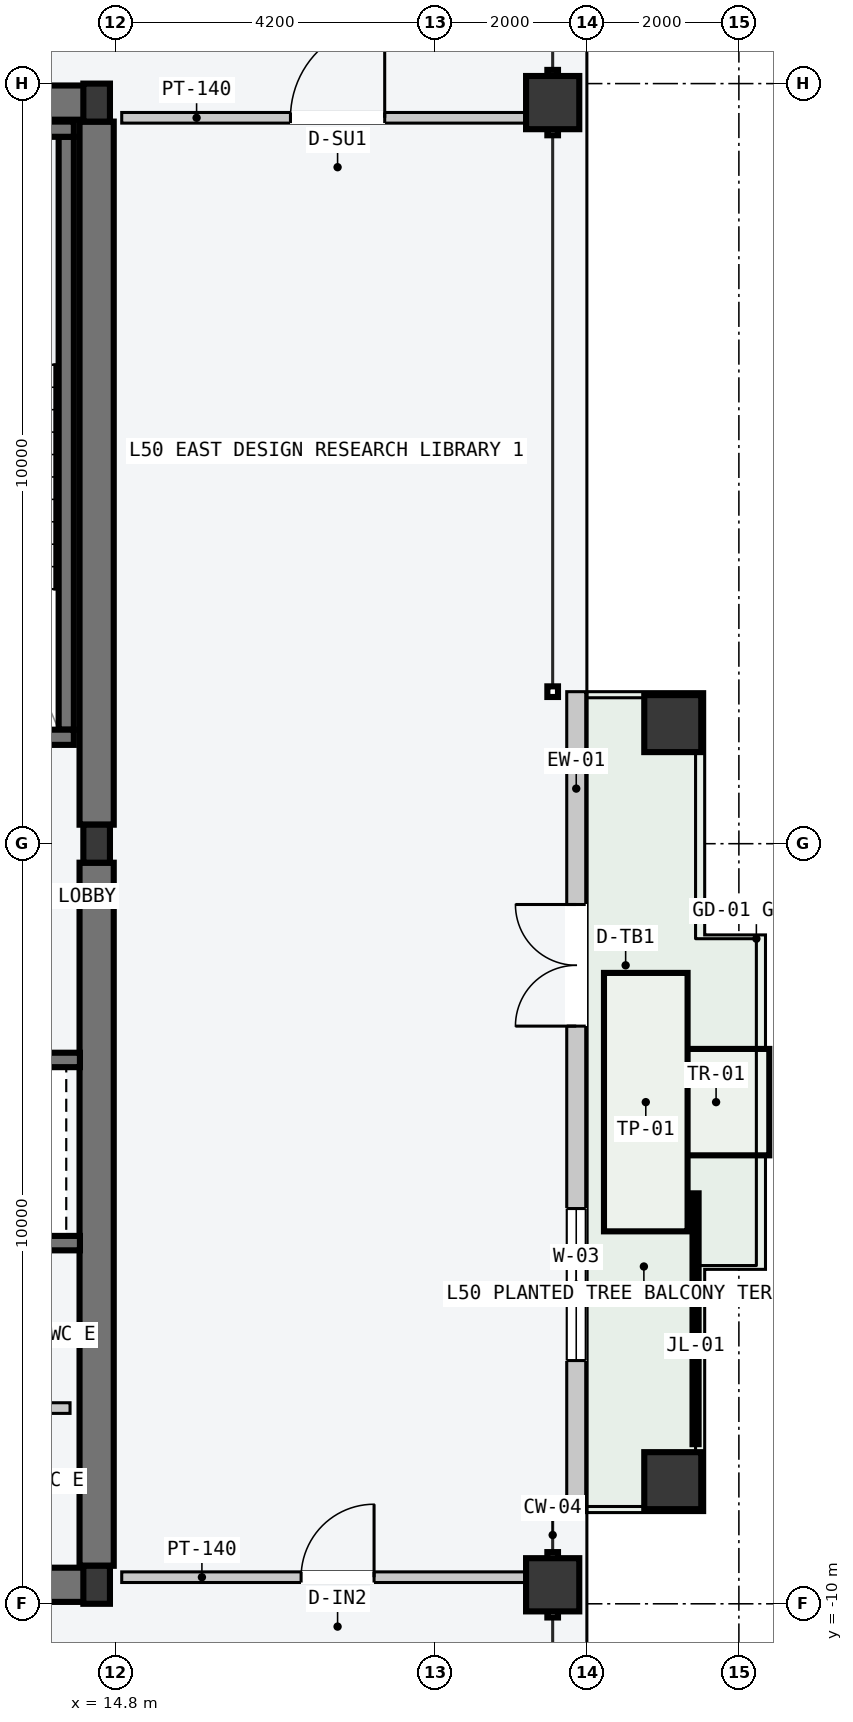
"""IFC4 building model, lengths in metres.
Left out: names, types, materials, properties, quantities, classifications, styles, units other than length and angle.
Written with IfcOpenShell. Run it as: python <this file> out.ifc"""

import sys

from ifc_helpers import new_model, si_unit, direction, frame, frame_2d, origin, origin_2d, place, context, subcontext, project, spatial, rectangle, hollow_rectangle, i_section, extrude, element, fill, save


model = new_model("IFC4")
c1 = context("Model", 3, precision=1e-05, world=origin(), true_north=direction((0.0, 1.0)))
c2 = subcontext(c1, "Body", "Model", "MODEL_VIEW")
j1 = project(units=[si_unit("LENGTHUNIT", "METRE"), si_unit("PLANEANGLEUNIT", "RADIAN")], contexts=[c1])
p1 = place(None, origin())
s1 = spatial("IfcSite", under=j1, at=p1, CompositionType="ELEMENT")
p2 = place(p1, origin())
s2 = spatial("IfcBuilding", under=s1, at=p2, CompositionType="ELEMENT")
p3 = place(p2, frame((0.0, 0.0, 191.1)))
s3 = spatial("IfcBuildingStorey", under=s2, at=p3, CompositionType="ELEMENT", Elevation=191.1)
for number, where, z_axis, x_axis in (
    (1, (8.07, -9.75, -0.2), (0.0, 0.0, 1.0), (1.0, 0.0, 0.0)),
    (2, (8.07, 9.75, -0.2), (0.0, 0.0, 1.0), (1.0, 0.0, 0.0)),
):
    element("IfcWall", number, at=place(p3, frame(where, z_axis=z_axis, x_axis=x_axis)), inside=s3, PredefinedType="SHEAR", context=c2, shape_type="SweptSolid", body=[
        extrude(rectangle(XDim=6.46, YDim=0.45, at=frame_2d((3.23, 0.0))), origin(), (0.0, 0.0, 1.0), 3.6),
    ])
for number, where, z_axis, x_axis in (
    (3, (14.55, -9.5, -0.2), (0.0, 0.0, 1.0), (0.0, 1.0, 0.0)),
    (4, (14.55, 0.25, -0.2), (0.0, 0.0, 1.0), (0.0, 1.0, 0.0)),
):
    element("IfcWall", number, at=place(p3, frame(where, z_axis=z_axis, x_axis=x_axis)), inside=s3, PredefinedType="SHEAR", context=c2, shape_type="SweptSolid", body=[
        extrude(rectangle(XDim=9.25, YDim=0.45, at=frame_2d((4.625, 0.0))), origin(), (0.0, 0.0, 1.0), 3.6),
    ])
p4 = place(p3, frame((14.15, 1.5, -0.2), z_axis=(0.0, 0.0, 1.0), x_axis=(0.0, 1.0, 0.0)))
e5 = element("IfcWall", 5, at=p4, inside=s3, PredefinedType="SOLIDWALL", context=c2, shape_type="SweptSolid", body=[
    extrude(rectangle(XDim=7.8, YDim=0.2, at=frame_2d((3.9, 0.0))), origin(), (0.0, 0.0, 1.0), 3.6),
])
p5 = place(p3, frame((10.53, 1.4, -0.2), z_axis=(0.0, 0.0, 1.0), x_axis=(1.0, 0.0, 0.0)))
e6 = element("IfcWall", 6, at=p5, inside=s3, PredefinedType="SOLIDWALL", context=c2, shape_type="SweptSolid", body=[
    extrude(rectangle(XDim=3.72, YDim=0.2, at=frame_2d((1.86, 0.0))), origin(), (0.0, 0.0, 1.0), 3.6),
])
p6 = place(p5, frame((1.5, 0.0, 0.2)))
e7 = element("IfcOpeningElement", 7, at=p6, cuts=e6, PredefinedType="OPENING", context=c2, shape_type="SweptSolid", body=[
    extrude(rectangle(XDim=1.12, YDim=2.18, at=frame_2d((0.56, 1.09))), frame((0.0, 0.11, 0.0), z_axis=(0.0, -1.0, 0.0), x_axis=(1.0, 0.0, 0.0)), (0.0, 0.0, 1.0), 0.22),
])
p7 = place(p3, frame((10.53, 9.4, -0.2), z_axis=(0.0, 0.0, 1.0), x_axis=(1.0, 0.0, 0.0)))
e8 = element("IfcWall", 8, at=p7, inside=s3, PredefinedType="SOLIDWALL", context=c2, shape_type="SweptSolid", body=[
    extrude(rectangle(XDim=3.72, YDim=0.2, at=frame_2d((1.86, 0.0))), origin(), (0.0, 0.0, 1.0), 3.6),
])
for number, where, z_axis, x_axis in (
    (9, (14.55, -9.75, 0.0), (0.0, 0.0, 1.0), (1.0, 0.0, 0.0)),
    (10, (14.55, 0.0, 0.0), (0.0, 0.0, 1.0), (1.0, 0.0, 0.0)),
    (11, (14.55, 9.75, 0.0), (0.0, 0.0, 1.0), (1.0, 0.0, 0.0)),
):
    element("IfcColumn", number, at=place(p3, frame(where, z_axis=z_axis, x_axis=x_axis)), inside=s3, PredefinedType="COLUMN", context=c2, shape_type="SweptSolid", body=[
        extrude(i_section(OverallWidth=0.35, OverallDepth=0.5, WebThickness=0.02, FlangeThickness=0.032, at=origin_2d()), origin(), (0.0, 0.0, 1.0), 3.6),
    ])
for number, where, z_axis, x_axis in (
    (12, (20.55, -9.75, 0.0), (0.0, 0.0, 1.0), (0.0, 1.0, 0.0)),
    (13, (20.55, 9.75, 0.0), (0.0, 0.0, 1.0), (0.0, 1.0, 0.0)),
):
    element("IfcColumn", number, at=place(p3, frame(where, z_axis=z_axis, x_axis=x_axis)), inside=s3, PredefinedType="COLUMN", context=c2, shape_type="SweptSolid", body=[
        extrude(hollow_rectangle(XDim=0.7, YDim=0.7, WallThickness=0.03, at=origin_2d()), origin(), (0.0, 0.0, 1.0), 3.6),
    ])
for number, where, z_axis, x_axis in (
    (14, (22.13, -8.38, 0.0), (0.0, 0.0, 1.0), (0.0, 1.0, 0.0)),
    (15, (22.13, 1.58, 0.0), (0.0, 0.0, 1.0), (0.0, 1.0, 0.0)),
):
    element("IfcColumn", number, at=place(p3, frame(where, z_axis=z_axis, x_axis=x_axis)), inside=s3, PredefinedType="COLUMN", context=c2, shape_type="SweptSolid", body=[
        extrude(hollow_rectangle(XDim=0.75, YDim=0.75, WallThickness=0.032, at=origin_2d()), origin(), (0.0, 0.0, 1.0), 3.6),
    ])
p8 = place(p3, frame((20.86, -8.8, 0.0), z_axis=(0.0, 0.0, 1.0), x_axis=(0.0, 1.0, 0.0)))
e16 = element("IfcWall", 16, at=p8, inside=s3, PredefinedType="STANDARD", context=c2, shape_type="SweptSolid", body=[
    extrude(rectangle(XDim=10.8, YDim=0.25, at=frame_2d((5.4, 0.0))), origin(), (0.0, 0.0, 1.0), 3.4),
])
p9 = place(p8, frame((6.4, 0.0, 0.0)))
e17 = element("IfcOpeningElement", 17, at=p9, cuts=e16, PredefinedType="OPENING", context=c2, shape_type="SweptSolid", body=[
    extrude(rectangle(XDim=1.6, YDim=2.2, at=frame_2d((0.8, 1.1))), frame((0.0, 0.135, 0.0), z_axis=(0.0, -1.0, 0.0), x_axis=(1.0, 0.0, 0.0)), (0.0, 0.0, 1.0), 0.27),
])
p10 = place(p8, frame((2.0, 0.0, 0.85)))
e18 = element("IfcOpeningElement", 18, at=p10, cuts=e16, PredefinedType="OPENING", context=c2, shape_type="SweptSolid", body=[
    extrude(rectangle(XDim=2.0, YDim=2.1, at=frame_2d((1.0, 1.05))), frame((0.0, 0.135, 0.0), z_axis=(0.0, -1.0, 0.0), x_axis=(1.0, 0.0, 0.0)), (0.0, 0.0, 1.0), 0.27),
])
p11 = place(p3, frame((11.65, -2.845, -0.2), z_axis=(0.0, 0.0, 1.0), x_axis=(1.0, 0.0, 0.0)))
e19 = element("IfcWall", 19, at=p11, inside=s3, PredefinedType="SOLIDWALL", context=c2, shape_type="SweptSolid", body=[
    extrude(rectangle(XDim=2.68, YDim=0.19, at=frame_2d((1.34, 0.0))), origin(), (0.0, 0.0, 1.0), 3.6),
])
p12 = place(p11, frame((0.65, 0.0, 0.2)))
e20 = element("IfcOpeningElement", 20, at=p12, cuts=e19, PredefinedType="OPENING", context=c2, shape_type="SweptSolid", body=[
    extrude(rectangle(XDim=1.2, YDim=2.2, at=frame_2d((0.6, 1.1))), frame((0.0, 0.105, 0.0), z_axis=(0.0, -1.0, 0.0), x_axis=(1.0, 0.0, 0.0)), (0.0, 0.0, 1.0), 0.21),
])
p13 = place(p3, frame((11.65, -5.255, -0.2), z_axis=(0.0, 0.0, 1.0), x_axis=(1.0, 0.0, 0.0)))
e21 = element("IfcWall", 21, at=p13, inside=s3, PredefinedType="SOLIDWALL", context=c2, shape_type="SweptSolid", body=[
    extrude(rectangle(XDim=2.68, YDim=0.19, at=frame_2d((1.34, 0.0))), origin(), (0.0, 0.0, 1.0), 3.6),
])
p14 = place(p3, frame((11.7, -7.425, 0.0), z_axis=(0.0, 0.0, 1.0), x_axis=(1.0, 0.0, 0.0)))
e22 = element("IfcWall", 22, at=p14, inside=s3, PredefinedType="PARTITIONING", context=c2, shape_type="SweptSolid", body=[
    extrude(rectangle(XDim=2.5, YDim=0.14, at=frame_2d((1.25, 0.0))), origin(), (0.0, 0.0, 1.0), 3.4),
])
p15 = place(p3, frame((14.88, 9.55, 0.0), z_axis=(0.0, 0.0, 1.0), x_axis=(1.0, 0.0, 0.0)))
e23 = element("IfcWall", 23, at=p15, inside=s3, PredefinedType="PARTITIONING", context=c2, shape_type="SweptSolid", body=[
    extrude(rectangle(XDim=5.68, YDim=0.14, at=frame_2d((2.84, 0.0))), origin(), (0.0, 0.0, 1.0), 3.4),
])
p16 = place(p15, frame((2.22, 0.0, 0.0)))
e24 = element("IfcOpeningElement", 24, at=p16, cuts=e23, PredefinedType="OPENING", context=c2, shape_type="SweptSolid", body=[
    extrude(rectangle(XDim=1.24, YDim=2.24, at=frame_2d((0.62, 1.12))), frame((0.0, 0.08, 0.0), z_axis=(0.0, -1.0, 0.0), x_axis=(1.0, 0.0, 0.0)), (0.0, 0.0, 1.0), 0.16),
])
p17 = place(p3, frame((14.88, -9.65, 0.0), z_axis=(0.0, 0.0, 1.0), x_axis=(1.0, 0.0, 0.0)))
e25 = element("IfcWall", 25, at=p17, inside=s3, PredefinedType="PARTITIONING", context=c2, shape_type="SweptSolid", body=[
    extrude(rectangle(XDim=5.68, YDim=0.14, at=frame_2d((2.84, 0.0))), origin(), (0.0, 0.0, 1.0), 2.75),
])
p18 = place(p17, frame((2.36, 0.0, 0.0)))
e26 = element("IfcOpeningElement", 26, at=p18, cuts=e25, PredefinedType="OPENING", context=c2, shape_type="SweptSolid", body=[
    extrude(rectangle(XDim=0.96, YDim=2.18, at=frame_2d((0.48, 1.09))), frame((0.0, 0.08, 0.0), z_axis=(0.0, -1.0, 0.0), x_axis=(1.0, 0.0, 0.0)), (0.0, 0.0, 1.0), 0.16),
])
p19 = place(p9, origin())
e27 = element("IfcDoor", 27, at=p19, inside=s3, OperationType="DOUBLE_DOOR_SINGLE_SWING", PredefinedType="DOOR", context=c2, shape_type="SweptSolid", body=[
    extrude(rectangle(XDim=1.6, YDim=2.2, at=frame_2d((0.8, 1.1))), frame((0.0, 0.025, 0.0), z_axis=(0.0, -1.0, 0.0), x_axis=(1.0, 0.0, 0.0)), (0.0, 0.0, 1.0), 0.05),
])
fill(e17, e27)
p20 = place(p10, origin())
e28 = element("IfcWindow", 28, at=p20, inside=s3, PartitioningType="SINGLE_PANEL", PredefinedType="WINDOW", context=c2, shape_type="SweptSolid", body=[
    extrude(rectangle(XDim=2.0, YDim=2.1, at=frame_2d((1.0, 1.05))), frame((0.0, 0.03, 0.0), z_axis=(0.0, -1.0, 0.0), x_axis=(1.0, 0.0, 0.0)), (0.0, 0.0, 1.0), 0.06),
])
fill(e18, e28)
p21 = place(p16, origin())
e29 = element("IfcDoor", 29, at=p21, inside=s3, OperationType="SINGLE_SWING_RIGHT", PredefinedType="DOOR", context=c2, shape_type="SweptSolid", body=[
    extrude(rectangle(XDim=1.24, YDim=2.24, at=frame_2d((0.62, 1.12))), frame((0.0, 0.025, 0.0), z_axis=(0.0, -1.0, 0.0), x_axis=(1.0, 0.0, 0.0)), (0.0, 0.0, 1.0), 0.05),
])
fill(e24, e29)
p22 = place(p18, origin())
e30 = element("IfcDoor", 30, at=p22, inside=s3, OperationType="SINGLE_SWING_RIGHT", PredefinedType="DOOR", context=c2, shape_type="SweptSolid", body=[
    extrude(rectangle(XDim=0.96, YDim=2.18, at=frame_2d((0.48, 1.09))), frame((0.0, 0.025, 0.0), z_axis=(0.0, -1.0, 0.0), x_axis=(1.0, 0.0, 0.0)), (0.0, 0.0, 1.0), 0.05),
])
fill(e26, e30)
save(model, sys.argv[1])
